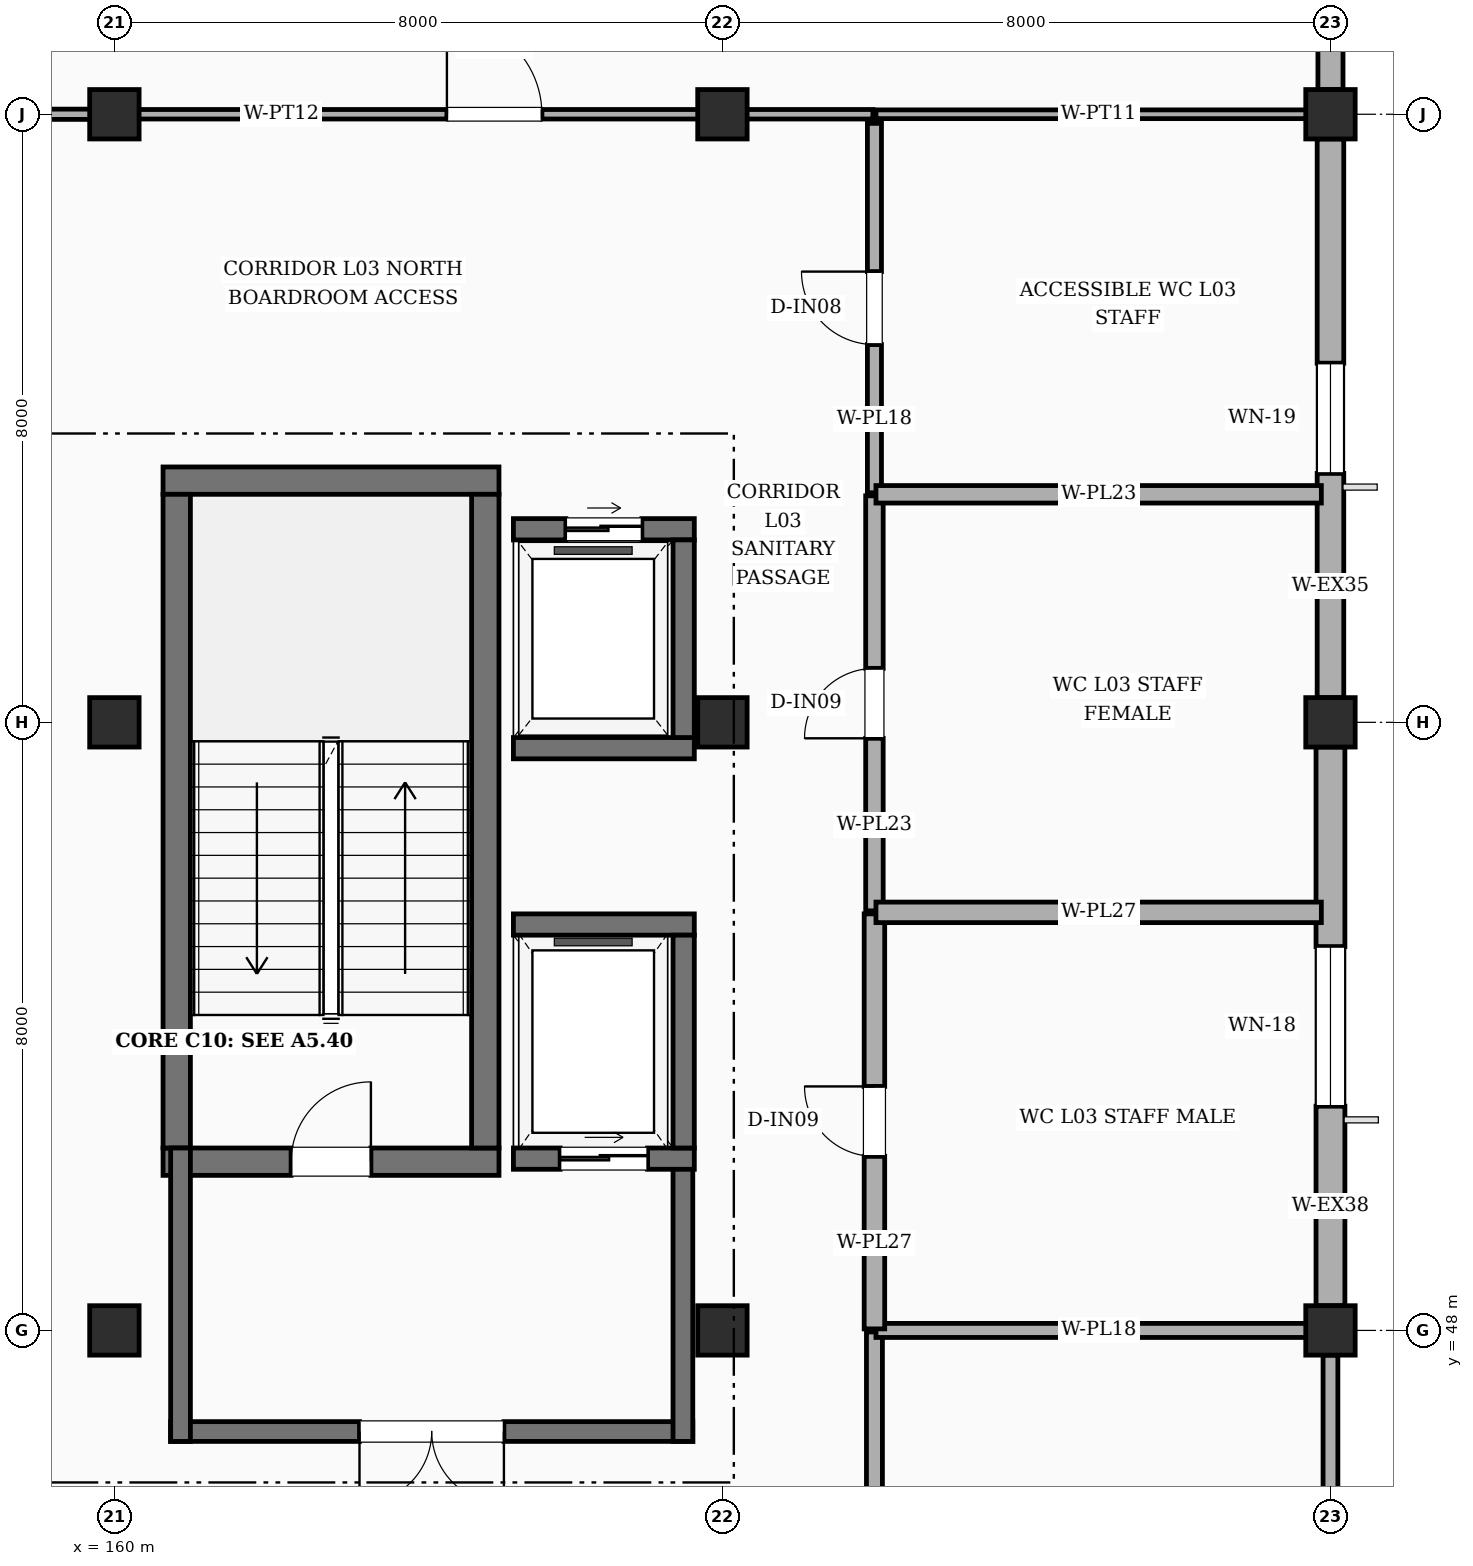
"""IFC4 building model, lengths in metres.
Left out: names, types, materials, properties, quantities, classifications, styles, units other than length and angle.
Written with IfcOpenShell. Run it as: python <this file> out.ifc"""

import sys

from ifc_helpers import new_model, si_unit, direction, frame, frame_2d, origin, origin_2d, place, context, subcontext, project, spatial, rectangle, extrude, element, fill, save


model = new_model("IFC4")
c1 = context("Model", 3, precision=1e-05, world=origin(), true_north=direction((0.0, 1.0)))
c2 = subcontext(c1, "Body", "Model", "MODEL_VIEW")
j1 = project(units=[si_unit("LENGTHUNIT", "METRE"), si_unit("PLANEANGLEUNIT", "RADIAN")], contexts=[c1])
p1 = place(None, origin())
s1 = spatial("IfcSite", under=j1, at=p1, CompositionType="ELEMENT")
p2 = place(p1, origin())
s2 = spatial("IfcBuilding", under=s1, at=p2, CompositionType="ELEMENT")
p3 = place(p2, frame((0.0, 0.0, 15.0)))
s3 = spatial("IfcBuildingStorey", under=s2, at=p3, CompositionType="ELEMENT", Elevation=15.0)
for number, where, z_axis, x_axis in (
    (1, (160.0, 48.0, 0.0), (0.0, 0.0, 1.0), (1.0, 0.0, 0.0)),
    (2, (160.0, 56.0, 0.0), (0.0, 0.0, 1.0), (1.0, 0.0, 0.0)),
    (3, (160.0, 64.0, 0.0), (0.0, 0.0, 1.0), (1.0, 0.0, 0.0)),
    (4, (168.0, 48.0, 0.0), (0.0, 0.0, 1.0), (1.0, 0.0, 0.0)),
    (5, (168.0, 56.0, 0.0), (0.0, 0.0, 1.0), (1.0, 0.0, 0.0)),
    (6, (168.0, 64.0, 0.0), (0.0, 0.0, 1.0), (1.0, 0.0, 0.0)),
    (7, (176.0, 48.0, 0.0), (0.0, 0.0, 1.0), (1.0, 0.0, 0.0)),
    (8, (176.0, 56.0, 0.0), (0.0, 0.0, 1.0), (1.0, 0.0, 0.0)),
    (9, (176.0, 64.0, 0.0), (0.0, 0.0, 1.0), (1.0, 0.0, 0.0)),
):
    element("IfcColumn", number, at=place(p3, frame(where, z_axis=z_axis, x_axis=x_axis)), inside=s3, PredefinedType="COLUMN", context=c2, shape_type="SweptSolid", body=[
        extrude(rectangle(XDim=0.65, YDim=0.65, at=origin_2d()), origin(), (0.0, 0.0, 1.0), 4.2),
    ])
p4 = place(p3, frame((176.0, 40.325, 0.0), z_axis=(0.0, 0.0, 1.0), x_axis=(0.0, 1.0, 0.0)))
e10 = element("IfcWall", 10, at=p4, inside=s3, PredefinedType="SOLIDWALL", context=c2, shape_type="SweptSolid", body=[
    extrude(rectangle(XDim=7.35, YDim=0.195, at=frame_2d((3.675, 0.0))), origin(), (0.0, 0.0, 1.0), 3.34),
])
p5 = place(p4, frame((2.95, 0.0, 1.15)))
e11 = element("IfcOpeningElement", 11, at=p5, cuts=e10, PredefinedType="OPENING", context=c2, shape_type="SweptSolid", body=[
    extrude(rectangle(XDim=1.45, YDim=1.4, at=frame_2d((0.725, 0.7))), frame((0.0, 0.107, 0.0), z_axis=(0.0, -1.0, 0.0), x_axis=(1.0, 0.0, 0.0)), (0.0, 0.0, 1.0), 0.215),
])
p6 = place(p3, frame((176.0, 48.325, 0.0), z_axis=(0.0, 0.0, 1.0), x_axis=(0.0, 1.0, 0.0)))
e12 = element("IfcWall", 12, at=p6, inside=s3, PredefinedType="STANDARD", context=c2, shape_type="SweptSolid", body=[
    extrude(rectangle(XDim=7.35, YDim=0.38, at=frame_2d((3.675, 0.0))), origin(), (0.0, 0.0, 1.0), 3.34),
])
p7 = place(p6, frame((2.625, 0.0, 1.15)))
e13 = element("IfcOpeningElement", 13, at=p7, cuts=e12, PredefinedType="OPENING", context=c2, shape_type="SweptSolid", body=[
    extrude(rectangle(XDim=2.1, YDim=1.4, at=frame_2d((1.05, 0.7))), frame((0.0, 0.2, 0.0), z_axis=(0.0, -1.0, 0.0), x_axis=(1.0, 0.0, 0.0)), (0.0, 0.0, 1.0), 0.4),
])
p8 = place(p3, frame((176.0, 56.325, 0.0), z_axis=(0.0, 0.0, 1.0), x_axis=(0.0, 1.0, 0.0)))
e14 = element("IfcWall", 14, at=p8, inside=s3, PredefinedType="STANDARD", context=c2, shape_type="SweptSolid", body=[
    extrude(rectangle(XDim=7.35, YDim=0.35, at=frame_2d((3.675, 0.0))), origin(), (0.0, 0.0, 1.0), 3.34),
])
p9 = place(p8, frame((2.95, 0.0, 1.15)))
e15 = element("IfcOpeningElement", 15, at=p9, cuts=e14, PredefinedType="OPENING", context=c2, shape_type="SweptSolid", body=[
    extrude(rectangle(XDim=1.45, YDim=1.4, at=frame_2d((0.725, 0.7))), frame((0.0, 0.185, 0.0), z_axis=(0.0, -1.0, 0.0), x_axis=(1.0, 0.0, 0.0)), (0.0, 0.0, 1.0), 0.37),
])
p10 = place(p3, frame((176.0, 64.325, 0.0), z_axis=(0.0, 0.0, 1.0), x_axis=(0.0, 1.0, 0.0)))
e16 = element("IfcWall", 16, at=p10, inside=s3, PredefinedType="STANDARD", context=c2, shape_type="SweptSolid", body=[
    extrude(rectangle(XDim=7.375, YDim=0.33, at=frame_2d((3.688, 0.0))), origin(), (0.0, 0.0, 1.0), 3.34),
])
p11 = place(p10, frame((2.637, 0.0, 1.15)))
e17 = element("IfcOpeningElement", 17, at=p11, cuts=e16, PredefinedType="OPENING", context=c2, shape_type="SweptSolid", body=[
    extrude(rectangle(XDim=2.1, YDim=1.4, at=frame_2d((1.05, 0.7))), frame((0.0, 0.175, 0.0), z_axis=(0.0, -1.0, 0.0), x_axis=(1.0, 0.0, 0.0)), (0.0, 0.0, 1.0), 0.35),
])
p12 = place(p3, frame((160.64, 50.22, 0.0), z_axis=(0.0, 0.0, 1.0), x_axis=(1.0, 0.0, 0.0)))
e18 = element("IfcWall", 18, at=p12, inside=s3, PredefinedType="SHEAR", context=c2, shape_type="SweptSolid", body=[
    extrude(rectangle(XDim=4.42, YDim=0.36, at=frame_2d((2.21, 0.0))), origin(), (0.0, 0.0, 1.0), 4.2),
])
p13 = place(p12, frame((1.685, 0.0, 0.0)))
e19 = element("IfcOpeningElement", 19, at=p13, cuts=e18, PredefinedType="OPENING", context=c2, shape_type="SweptSolid", body=[
    extrude(rectangle(XDim=1.05, YDim=2.15, at=frame_2d((0.525, 1.075))), frame((0.0, 0.19, 0.0), z_axis=(0.0, -1.0, 0.0), x_axis=(1.0, 0.0, 0.0)), (0.0, 0.0, 1.0), 0.38),
])
p14 = place(p3, frame((160.64, 59.18, 0.0), z_axis=(0.0, 0.0, 1.0), x_axis=(1.0, 0.0, 0.0)))
e20 = element("IfcWall", 20, at=p14, inside=s3, PredefinedType="SHEAR", context=c2, shape_type="SweptSolid", body=[
    extrude(rectangle(XDim=4.42, YDim=0.36, at=frame_2d((2.21, 0.0))), origin(), (0.0, 0.0, 1.0), 4.2),
])
for number, where, z_axis, x_axis in (
    (21, (160.82, 50.4, 0.0), (0.0, 0.0, 1.0), (0.0, 1.0, 0.0)),
    (22, (164.88, 50.4, 0.0), (0.0, 0.0, 1.0), (0.0, 1.0, 0.0)),
):
    element("IfcWall", number, at=place(p3, frame(where, z_axis=z_axis, x_axis=x_axis)), inside=s3, PredefinedType="SHEAR", context=c2, shape_type="SweptSolid", body=[
        extrude(rectangle(XDim=8.6, YDim=0.36, at=frame_2d((4.3, 0.0))), origin(), (0.0, 0.0, 1.0), 4.2),
    ])
p15 = place(p3, frame((167.61, 46.67, 0.0), z_axis=(0.0, 0.0, 1.0), x_axis=(-1.0, 0.0, 0.0)))
e23 = element("IfcWall", 23, at=p15, inside=s3, PredefinedType="SHEAR", context=c2, shape_type="SweptSolid", body=[
    extrude(rectangle(XDim=6.87, YDim=0.26, at=frame_2d((3.435, 0.0))), origin(), (0.0, 0.0, 1.0), 4.2),
])
p16 = place(p15, frame((2.485, 0.0, 0.0)))
e24 = element("IfcOpeningElement", 24, at=p16, cuts=e23, PredefinedType="OPENING", context=c2, shape_type="SweptSolid", body=[
    extrude(rectangle(XDim=1.9, YDim=2.25, at=frame_2d((0.95, 1.125))), frame((0.0, 0.14, 0.0), z_axis=(0.0, -1.0, 0.0), x_axis=(1.0, 0.0, 0.0)), (0.0, 0.0, 1.0), 0.28),
])
for number, where, z_axis, x_axis in (
    (25, (160.87, 46.54, 0.0), (0.0, 0.0, 1.0), (0.0, 1.0, 0.0)),
    (26, (167.48, 46.54, 0.0), (0.0, 0.0, 1.0), (0.0, 1.0, 0.0)),
):
    element("IfcWall", number, at=place(p3, frame(where, z_axis=z_axis, x_axis=x_axis)), inside=s3, PredefinedType="SHEAR", context=c2, shape_type="SweptSolid", body=[
        extrude(rectangle(XDim=3.86, YDim=0.26, at=frame_2d((1.93, 0.0))), origin(), (0.0, 0.0, 1.0), 4.2),
    ])
p17 = place(p3, frame((165.25, 50.26, 0.0), z_axis=(0.0, 0.0, 1.0), x_axis=(1.0, 0.0, 0.0)))
e27 = element("IfcWall", 27, at=p17, inside=s3, PredefinedType="SHEAR", context=c2, shape_type="SweptSolid", body=[
    extrude(rectangle(XDim=2.38, YDim=0.28, at=frame_2d((1.19, 0.0))), origin(), (0.0, 0.0, 1.0), 4.2),
])
p18 = place(p17, frame((0.615, 0.0, 0.0)))
e28 = element("IfcOpeningElement", 28, at=p18, cuts=e27, PredefinedType="OPENING", context=c2, shape_type="SweptSolid", body=[
    extrude(rectangle(XDim=1.15, YDim=2.2, at=frame_2d((0.575, 1.1))), frame((0.0, 0.15, 0.0), z_axis=(0.0, -1.0, 0.0), x_axis=(1.0, 0.0, 0.0)), (0.0, 0.0, 1.0), 0.3),
])
p19 = place(p3, frame((165.25, 53.34, 0.0), z_axis=(0.0, 0.0, 1.0), x_axis=(1.0, 0.0, 0.0)))
e29 = element("IfcWall", 29, at=p19, inside=s3, PredefinedType="SHEAR", context=c2, shape_type="SweptSolid", body=[
    extrude(rectangle(XDim=2.38, YDim=0.28, at=frame_2d((1.19, 0.0))), origin(), (0.0, 0.0, 1.0), 4.2),
])
p20 = place(p3, frame((167.49, 50.4, 0.0), z_axis=(0.0, 0.0, 1.0), x_axis=(0.0, 1.0, 0.0)))
e30 = element("IfcWall", 30, at=p20, inside=s3, PredefinedType="SHEAR", context=c2, shape_type="SweptSolid", body=[
    extrude(rectangle(XDim=2.8, YDim=0.28, at=frame_2d((1.4, 0.0))), origin(), (0.0, 0.0, 1.0), 4.2),
])
p21 = place(p3, frame((165.25, 55.66, 0.0), z_axis=(0.0, 0.0, 1.0), x_axis=(1.0, 0.0, 0.0)))
e31 = element("IfcWall", 31, at=p21, inside=s3, PredefinedType="SHEAR", context=c2, shape_type="SweptSolid", body=[
    extrude(rectangle(XDim=2.38, YDim=0.28, at=frame_2d((1.19, 0.0))), origin(), (0.0, 0.0, 1.0), 4.2),
])
p22 = place(p3, frame((165.25, 58.54, 0.0), z_axis=(0.0, 0.0, 1.0), x_axis=(1.0, 0.0, 0.0)))
e32 = element("IfcWall", 32, at=p22, inside=s3, PredefinedType="SHEAR", context=c2, shape_type="SweptSolid", body=[
    extrude(rectangle(XDim=2.38, YDim=0.28, at=frame_2d((1.19, 0.0))), origin(), (0.0, 0.0, 1.0), 4.2),
])
p23 = place(p22, frame((0.69, 0.0, 0.0)))
e33 = element("IfcOpeningElement", 33, at=p23, cuts=e32, PredefinedType="OPENING", context=c2, shape_type="SweptSolid", body=[
    extrude(rectangle(XDim=1.0, YDim=2.15, at=frame_2d((0.5, 1.075))), frame((0.0, 0.15, 0.0), z_axis=(0.0, -1.0, 0.0), x_axis=(1.0, 0.0, 0.0)), (0.0, 0.0, 1.0), 0.3),
])
p24 = place(p3, frame((167.49, 55.8, 0.0), z_axis=(0.0, 0.0, 1.0), x_axis=(0.0, 1.0, 0.0)))
e34 = element("IfcWall", 34, at=p24, inside=s3, PredefinedType="SHEAR", context=c2, shape_type="SweptSolid", body=[
    extrude(rectangle(XDim=2.6, YDim=0.28, at=frame_2d((1.3, 0.0))), origin(), (0.0, 0.0, 1.0), 4.2),
])
p25 = place(p3, frame((170.0, 24.02, 0.0), z_axis=(0.0, 0.0, 1.0), x_axis=(0.0, 1.0, 0.0)))
e35 = element("IfcWall", 35, at=p25, inside=s3, PredefinedType="SOLIDWALL", context=c2, shape_type="SweptSolid", body=[
    extrude(rectangle(XDim=23.96, YDim=0.21, at=frame_2d((11.98, 0.0))), origin(), (0.0, 0.0, 1.0), 3.31),
])
p26 = place(p25, frame((11.38, 0.0, 0.0)))
e36 = element("IfcOpeningElement", 36, at=p26, cuts=e35, PredefinedType="OPENING", context=c2, shape_type="SweptSolid", body=[
    extrude(rectangle(XDim=1.2, YDim=2.15, at=frame_2d((0.6, 1.075))), frame((0.0, 0.115, 0.0), z_axis=(0.0, -1.0, 0.0), x_axis=(1.0, 0.0, 0.0)), (0.0, 0.0, 1.0), 0.23),
])
p27 = place(p3, frame((170.02, 48.0, 0.0), z_axis=(0.0, 0.0, 1.0), x_axis=(1.0, 0.0, 0.0)))
e37 = element("IfcWall", 37, at=p27, inside=s3, PredefinedType="PLUMBINGWALL", context=c2, shape_type="SweptSolid", body=[
    extrude(rectangle(XDim=5.86, YDim=0.185, at=frame_2d((2.93, 0.0))), origin(), (0.0, 0.0, 1.0), 3.31),
])
p28 = place(p3, frame((170.0, 48.02, 0.0), z_axis=(0.0, 0.0, 1.0), x_axis=(0.0, 1.0, 0.0)))
e38 = element("IfcWall", 38, at=p28, inside=s3, PredefinedType="PLUMBINGWALL", context=c2, shape_type="SweptSolid", body=[
    extrude(rectangle(XDim=5.46, YDim=0.27, at=frame_2d((2.73, 0.0))), origin(), (0.0, 0.0, 1.0), 3.31),
])
p29 = place(p28, frame((2.27, 0.0, 0.0)))
e39 = element("IfcOpeningElement", 39, at=p29, cuts=e38, PredefinedType="OPENING", context=c2, shape_type="SweptSolid", body=[
    extrude(rectangle(XDim=0.92, YDim=2.1, at=frame_2d((0.46, 1.05))), frame((0.0, 0.145, 0.0), z_axis=(0.0, -1.0, 0.0), x_axis=(1.0, 0.0, 0.0)), (0.0, 0.0, 1.0), 0.29),
])
p30 = place(p3, frame((170.0, 53.52, 0.0), z_axis=(0.0, 0.0, 1.0), x_axis=(0.0, 1.0, 0.0)))
e40 = element("IfcWall", 40, at=p30, inside=s3, PredefinedType="PLUMBINGWALL", context=c2, shape_type="SweptSolid", body=[
    extrude(rectangle(XDim=5.46, YDim=0.23, at=frame_2d((2.73, 0.0))), origin(), (0.0, 0.0, 1.0), 3.31),
])
p31 = place(p30, frame((2.27, 0.0, 0.0)))
e41 = element("IfcOpeningElement", 41, at=p31, cuts=e40, PredefinedType="OPENING", context=c2, shape_type="SweptSolid", body=[
    extrude(rectangle(XDim=0.92, YDim=2.1, at=frame_2d((0.46, 1.05))), frame((0.0, 0.125, 0.0), z_axis=(0.0, -1.0, 0.0), x_axis=(1.0, 0.0, 0.0)), (0.0, 0.0, 1.0), 0.25),
])
p32 = place(p3, frame((170.0, 59.02, 0.0), z_axis=(0.0, 0.0, 1.0), x_axis=(0.0, 1.0, 0.0)))
e42 = element("IfcWall", 42, at=p32, inside=s3, PredefinedType="PLUMBINGWALL", context=c2, shape_type="SweptSolid", body=[
    extrude(rectangle(XDim=4.86, YDim=0.185, at=frame_2d((2.43, 0.0))), origin(), (0.0, 0.0, 1.0), 3.31),
])
p33 = place(p32, frame((1.95, 0.0, 0.0)))
e43 = element("IfcOpeningElement", 43, at=p33, cuts=e42, PredefinedType="OPENING", context=c2, shape_type="SweptSolid", body=[
    extrude(rectangle(XDim=0.96, YDim=2.1, at=frame_2d((0.48, 1.05))), frame((0.0, 0.103, 0.0), z_axis=(0.0, -1.0, 0.0), x_axis=(1.0, 0.0, 0.0)), (0.0, 0.0, 1.0), 0.205),
])
p34 = place(p3, frame((170.02, 53.5, 0.0), z_axis=(0.0, 0.0, 1.0), x_axis=(1.0, 0.0, 0.0)))
e44 = element("IfcWall", 44, at=p34, inside=s3, PredefinedType="PLUMBINGWALL", context=c2, shape_type="SweptSolid", body=[
    extrude(rectangle(XDim=5.86, YDim=0.27, at=frame_2d((2.93, 0.0))), origin(), (0.0, 0.0, 1.0), 3.34),
])
p35 = place(p3, frame((170.02, 59.0, 0.0), z_axis=(0.0, 0.0, 1.0), x_axis=(1.0, 0.0, 0.0)))
e45 = element("IfcWall", 45, at=p35, inside=s3, PredefinedType="PLUMBINGWALL", context=c2, shape_type="SweptSolid", body=[
    extrude(rectangle(XDim=5.86, YDim=0.23, at=frame_2d((2.93, 0.0))), origin(), (0.0, 0.0, 1.0), 3.34),
])
p36 = place(p3, frame((152.12, 64.0, 0.0), z_axis=(0.0, 0.0, 1.0), x_axis=(1.0, 0.0, 0.0)))
e46 = element("IfcWall", 46, at=p36, inside=s3, PredefinedType="PARTITIONING", context=c2, shape_type="SweptSolid", body=[
    extrude(rectangle(XDim=7.86, YDim=0.135, at=frame_2d((3.93, 0.0))), origin(), (0.0, 0.0, 1.0), 3.34),
])
p37 = place(p3, frame((160.02, 64.0, 0.0), z_axis=(0.0, 0.0, 1.0), x_axis=(1.0, 0.0, 0.0)))
e47 = element("IfcWall", 47, at=p37, inside=s3, PredefinedType="PARTITIONING", context=c2, shape_type="SweptSolid", body=[
    extrude(rectangle(XDim=9.96, YDim=0.125, at=frame_2d((4.98, 0.0))), origin(), (0.0, 0.0, 1.0), 3.31),
])
p38 = place(p37, frame((4.355, 0.0, 0.0)))
e48 = element("IfcOpeningElement", 48, at=p38, cuts=e47, PredefinedType="OPENING", context=c2, shape_type="SweptSolid", body=[
    extrude(rectangle(XDim=1.25, YDim=2.15, at=frame_2d((0.625, 1.075))), frame((0.0, 0.073, 0.0), z_axis=(0.0, -1.0, 0.0), x_axis=(1.0, 0.0, 0.0)), (0.0, 0.0, 1.0), 0.145),
])
p39 = place(p3, frame((170.02, 64.0, 0.0), z_axis=(0.0, 0.0, 1.0), x_axis=(1.0, 0.0, 0.0)))
e49 = element("IfcWall", 49, at=p39, inside=s3, PredefinedType="PARTITIONING", context=c2, shape_type="SweptSolid", body=[
    extrude(rectangle(XDim=5.86, YDim=0.115, at=frame_2d((2.93, 0.0))), origin(), (0.0, 0.0, 1.0), 3.31),
])
p40 = place(p7, origin())
e50 = element("IfcWindow", 50, at=p40, inside=s3, PartitioningType="SINGLE_PANEL", PredefinedType="WINDOW", context=c2, shape_type="SweptSolid", body=[
    extrude(rectangle(XDim=2.1, YDim=1.4, at=frame_2d((1.05, 0.7))), frame((0.0, 0.03, 0.0), z_axis=(0.0, -1.0, 0.0), x_axis=(1.0, 0.0, 0.0)), (0.0, 0.0, 1.0), 0.06),
])
fill(e13, e50)
p41 = place(p9, origin())
e51 = element("IfcWindow", 51, at=p41, inside=s3, PartitioningType="SINGLE_PANEL", PredefinedType="WINDOW", context=c2, shape_type="SweptSolid", body=[
    extrude(rectangle(XDim=1.45, YDim=1.4, at=frame_2d((0.725, 0.7))), frame((0.0, 0.03, 0.0), z_axis=(0.0, -1.0, 0.0), x_axis=(1.0, 0.0, 0.0)), (0.0, 0.0, 1.0), 0.06),
])
fill(e15, e51)
p42 = place(p13, origin())
e52 = element("IfcDoor", 52, at=p42, inside=s3, OperationType="SINGLE_SWING_RIGHT", PredefinedType="DOOR", context=c2, shape_type="SweptSolid", body=[
    extrude(rectangle(XDim=1.05, YDim=2.15, at=frame_2d((0.525, 1.075))), frame((0.0, 0.025, 0.0), z_axis=(0.0, -1.0, 0.0), x_axis=(1.0, 0.0, 0.0)), (0.0, 0.0, 1.0), 0.05),
])
fill(e19, e52)
p43 = place(p16, origin())
e53 = element("IfcDoor", 53, at=p43, inside=s3, OperationType="DOUBLE_DOOR_SINGLE_SWING", PredefinedType="DOOR", context=c2, shape_type="SweptSolid", body=[
    extrude(rectangle(XDim=1.9, YDim=2.25, at=frame_2d((0.95, 1.125))), frame((0.0, 0.025, 0.0), z_axis=(0.0, -1.0, 0.0), x_axis=(1.0, 0.0, 0.0)), (0.0, 0.0, 1.0), 0.05),
])
fill(e24, e53)
p44 = place(p18, origin())
e54 = element("IfcDoor", 54, at=p44, inside=s3, OperationType="SLIDING_TO_LEFT", PredefinedType="DOOR", context=c2, shape_type="SweptSolid", body=[
    extrude(rectangle(XDim=1.15, YDim=2.2, at=frame_2d((0.575, 1.1))), frame((0.0, 0.025, 0.0), z_axis=(0.0, -1.0, 0.0), x_axis=(1.0, 0.0, 0.0)), (0.0, 0.0, 1.0), 0.05),
])
fill(e28, e54)
p45 = place(p23, origin())
e55 = element("IfcDoor", 55, at=p45, inside=s3, OperationType="SLIDING_TO_LEFT", PredefinedType="DOOR", context=c2, shape_type="SweptSolid", body=[
    extrude(rectangle(XDim=1.0, YDim=2.15, at=frame_2d((0.5, 1.075))), frame((0.0, 0.025, 0.0), z_axis=(0.0, -1.0, 0.0), x_axis=(1.0, 0.0, 0.0)), (0.0, 0.0, 1.0), 0.05),
])
fill(e33, e55)
p46 = place(p29, origin())
e56 = element("IfcDoor", 56, at=p46, inside=s3, OperationType="SINGLE_SWING_RIGHT", PredefinedType="DOOR", context=c2, shape_type="SweptSolid", body=[
    extrude(rectangle(XDim=0.92, YDim=2.1, at=frame_2d((0.46, 1.05))), frame((0.0, 0.025, 0.0), z_axis=(0.0, -1.0, 0.0), x_axis=(1.0, 0.0, 0.0)), (0.0, 0.0, 1.0), 0.05),
])
fill(e39, e56)
p47 = place(p31, origin())
e57 = element("IfcDoor", 57, at=p47, inside=s3, OperationType="SINGLE_SWING_LEFT", PredefinedType="DOOR", context=c2, shape_type="SweptSolid", body=[
    extrude(rectangle(XDim=0.92, YDim=2.1, at=frame_2d((0.46, 1.05))), frame((0.0, 0.025, 0.0), z_axis=(0.0, -1.0, 0.0), x_axis=(1.0, 0.0, 0.0)), (0.0, 0.0, 1.0), 0.05),
])
fill(e41, e57)
p48 = place(p33, origin())
e58 = element("IfcDoor", 58, at=p48, inside=s3, OperationType="SINGLE_SWING_RIGHT", PredefinedType="DOOR", context=c2, shape_type="SweptSolid", body=[
    extrude(rectangle(XDim=0.96, YDim=2.1, at=frame_2d((0.48, 1.05))), frame((0.0, 0.025, 0.0), z_axis=(0.0, -1.0, 0.0), x_axis=(1.0, 0.0, 0.0)), (0.0, 0.0, 1.0), 0.05),
])
fill(e43, e58)
p49 = place(p38, origin())
e59 = element("IfcDoor", 59, at=p49, inside=s3, OperationType="SINGLE_SWING_LEFT", PredefinedType="DOOR", context=c2, shape_type="SweptSolid", body=[
    extrude(rectangle(XDim=1.25, YDim=2.15, at=frame_2d((0.625, 1.075))), frame((0.0, 0.025, 0.0), z_axis=(0.0, -1.0, 0.0), x_axis=(1.0, 0.0, 0.0)), (0.0, 0.0, 1.0), 0.05),
])
fill(e48, e59)
save(model, sys.argv[1])
